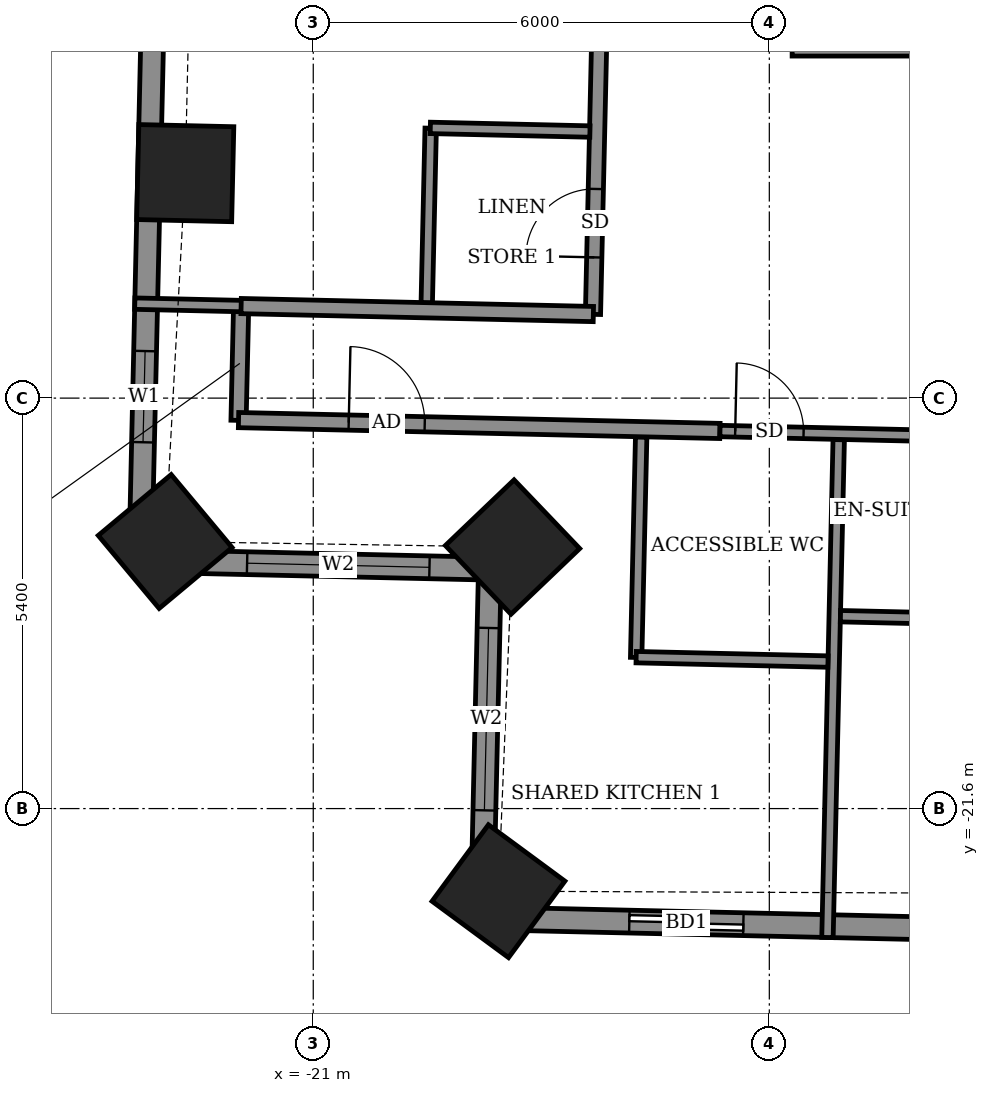
"""IFC4 building model, lengths in metres.
Left out: names, types, materials, properties, quantities, classifications, styles, units other than length and angle.
Written with IfcOpenShell. Run it as: python <this file> out.ifc"""

import sys

from ifc_helpers import new_model, si_unit, direction, frame, frame_2d, origin, origin_2d, place, context, subcontext, project, spatial, rectangle, extrude, element, fill, save


model = new_model("IFC4")
c1 = context("Model", 3, precision=1e-05, world=origin(), true_north=direction((0.0, 1.0)))
c2 = subcontext(c1, "Body", "Model", "MODEL_VIEW")
j1 = project(units=[si_unit("LENGTHUNIT", "METRE"), si_unit("PLANEANGLEUNIT", "RADIAN")], contexts=[c1])
p1 = place(None, origin())
s1 = spatial("IfcSite", under=j1, at=p1, CompositionType="ELEMENT")
p2 = place(p1, origin())
s2 = spatial("IfcBuilding", under=s1, at=p2, CompositionType="ELEMENT")
p3 = place(p2, frame((0.0, 0.0, 152.7)))
s3 = spatial("IfcBuildingStorey", under=s2, at=p3, CompositionType="ELEMENT", Elevation=152.7)
for number, where, z_axis, x_axis in (
    (1, (-22.684, -13.24, -0.55), (0.0, 0.0, 1.0), (-0.023, -1.0, 0.0)),
    (2, (-22.948, -18.086, -0.55), (0.0, 0.0, 1.0), (0.641, -0.768, 0.0)),
    (3, (-18.378, -18.159, -0.55), (0.0, 0.0, 1.0), (0.691, -0.723, 0.0)),
    (4, (-18.563, -22.687, -0.55), (0.0, 0.0, 1.0), (0.805, -0.593, 0.0)),
):
    element("IfcColumn", number, at=place(p3, frame(where, z_axis=z_axis, x_axis=x_axis)), inside=s3, PredefinedType="COLUMN", context=c2, shape_type="SweptSolid", body=[
        extrude(rectangle(XDim=1.25, YDim=1.25, at=origin_2d()), origin(), (0.0, 0.0, 1.0), 3.6),
    ])
p4 = place(p3, frame((-23.038, -7.913, 0.0), z_axis=(0.0, 0.0, 1.0), x_axis=(-0.022705985163, -0.999742185885, 0.0)))
e5 = element("IfcWall", 5, at=p4, inside=s3, PredefinedType="SOLIDWALL", context=c2, shape_type="SweptSolid", body=[
    extrude(rectangle(XDim=10.43, YDim=0.3, at=frame_2d((5.215, 0.0))), origin(), (0.0, 0.0, 1.0), 3.05),
])
p5 = place(p4, frame((1.936, 0.0, 0.0)))
e6 = element("IfcOpeningElement", 6, at=p5, cuts=e5, PredefinedType="OPENING", context=c2, shape_type="SweptSolid", body=[
    extrude(rectangle(XDim=1.5, YDim=2.4, at=frame_2d((0.75, 1.2))), frame((0.0, 0.16, 0.0), z_axis=(0.0, -1.0, 0.0), x_axis=(1.0, 0.0, 0.0)), (0.0, 0.0, 1.0), 0.32),
])
p6 = place(p4, frame((7.67, 0.0, 0.9)))
e7 = element("IfcOpeningElement", 7, at=p6, cuts=e5, PredefinedType="OPENING", context=c2, shape_type="SweptSolid", body=[
    extrude(rectangle(XDim=1.2, YDim=1.5, at=frame_2d((0.6, 0.75))), frame((0.0, 0.16, 0.0), z_axis=(0.0, -1.0, 0.0), x_axis=(1.0, 0.0, 0.0)), (0.0, 0.0, 1.0), 0.32),
])
p7 = place(p3, frame((-23.275, -18.34, 0.0), z_axis=(0.0, 0.0, 1.0), x_axis=(0.999744377441, -0.022609285172, 0.0)))
e8 = element("IfcWall", 8, at=p7, inside=s3, PredefinedType="SOLIDWALL", context=c2, shape_type="SweptSolid", body=[
    extrude(rectangle(XDim=4.6, YDim=0.3, at=frame_2d((2.3, 0.0))), origin(), (0.0, 0.0, 1.0), 2.55),
])
p8 = place(p7, frame((1.405, 0.0, 0.9)))
e9 = element("IfcOpeningElement", 9, at=p8, cuts=e8, PredefinedType="OPENING", context=c2, shape_type="SweptSolid", body=[
    extrude(rectangle(XDim=2.4, YDim=1.5, at=frame_2d((1.2, 0.75))), frame((0.0, 0.16, 0.0), z_axis=(0.0, -1.0, 0.0), x_axis=(1.0, 0.0, 0.0)), (0.0, 0.0, 1.0), 0.32),
])
p9 = place(p3, frame((-18.676, -18.444, 0.0), z_axis=(0.0, 0.0, 1.0), x_axis=(-0.022821468877, -0.999739556364, 0.0)))
e10 = element("IfcWall", 10, at=p9, inside=s3, PredefinedType="SOLIDWALL", context=c2, shape_type="SweptSolid", body=[
    extrude(rectangle(XDim=4.6, YDim=0.3, at=frame_2d((2.3, 0.0))), origin(), (0.0, 0.0, 1.0), 2.55),
])
p10 = place(p9, frame((0.78, 0.0, 0.9)))
e11 = element("IfcOpeningElement", 11, at=p10, cuts=e10, PredefinedType="OPENING", context=c2, shape_type="SweptSolid", body=[
    extrude(rectangle(XDim=2.4, YDim=1.5, at=frame_2d((1.2, 0.75))), frame((0.0, 0.16, 0.0), z_axis=(0.0, -1.0, 0.0), x_axis=(1.0, 0.0, 0.0)), (0.0, 0.0, 1.0), 0.32),
])
p11 = place(p3, frame((-18.781, -23.043, 0.0), z_axis=(0.0, 0.0, 1.0), x_axis=(0.999742794992, -0.022679150367, 0.0)))
e12 = element("IfcWall", 12, at=p11, inside=s3, PredefinedType="SOLIDWALL", context=c2, shape_type="SweptSolid", body=[
    extrude(rectangle(XDim=38.98, YDim=0.3, at=frame_2d((19.49, 0.0))), origin(), (0.0, 0.0, 1.0), 3.05),
])
p12 = place(p11, frame((1.94, 0.0, 0.0)))
e13 = element("IfcOpeningElement", 13, at=p12, cuts=e12, PredefinedType="OPENING", context=c2, shape_type="SweptSolid", body=[
    extrude(rectangle(XDim=1.5, YDim=2.4, at=frame_2d((0.75, 1.2))), frame((0.0, 0.16, 0.0), z_axis=(0.0, -1.0, 0.0), x_axis=(1.0, 0.0, 0.0)), (0.0, 0.0, 1.0), 0.32),
])
p13 = place(p11, frame((7.211, 0.0, 0.0)))
e14 = element("IfcOpeningElement", 14, at=p13, cuts=e12, PredefinedType="OPENING", context=c2, shape_type="SweptSolid", body=[
    extrude(rectangle(XDim=1.2, YDim=2.4, at=frame_2d((0.6, 1.2))), frame((0.0, 0.16, 0.0), z_axis=(0.0, -1.0, 0.0), x_axis=(1.0, 0.0, 0.0)), (0.0, 0.0, 1.0), 0.32),
])
p14 = place(p11, frame((9.959, 0.0, 0.0)))
e15 = element("IfcOpeningElement", 15, at=p14, cuts=e12, PredefinedType="OPENING", context=c2, shape_type="SweptSolid", body=[
    extrude(rectangle(XDim=1.5, YDim=2.4, at=frame_2d((0.75, 1.2))), frame((0.0, 0.16, 0.0), z_axis=(0.0, -1.0, 0.0), x_axis=(1.0, 0.0, 0.0)), (0.0, 0.0, 1.0), 0.32),
])
p15 = place(p11, frame((14.659, 0.0, 0.0)))
e16 = element("IfcOpeningElement", 16, at=p15, cuts=e12, PredefinedType="OPENING", context=c2, shape_type="SweptSolid", body=[
    extrude(rectangle(XDim=1.5, YDim=2.4, at=frame_2d((0.75, 1.2))), frame((0.0, 0.16, 0.0), z_axis=(0.0, -1.0, 0.0), x_axis=(1.0, 0.0, 0.0)), (0.0, 0.0, 1.0), 0.32),
])
p16 = place(p11, frame((20.232, 0.0, 0.0)))
e17 = element("IfcOpeningElement", 17, at=p16, cuts=e12, PredefinedType="OPENING", context=c2, shape_type="SweptSolid", body=[
    extrude(rectangle(XDim=1.2, YDim=2.4, at=frame_2d((0.6, 1.2))), frame((0.0, 0.16, 0.0), z_axis=(0.0, -1.0, 0.0), x_axis=(1.0, 0.0, 0.0)), (0.0, 0.0, 1.0), 0.32),
])
p17 = place(p11, frame((22.981, 0.0, 0.0)))
e18 = element("IfcOpeningElement", 18, at=p17, cuts=e12, PredefinedType="OPENING", context=c2, shape_type="SweptSolid", body=[
    extrude(rectangle(XDim=1.5, YDim=2.4, at=frame_2d((0.75, 1.2))), frame((0.0, 0.16, 0.0), z_axis=(0.0, -1.0, 0.0), x_axis=(1.0, 0.0, 0.0)), (0.0, 0.0, 1.0), 0.32),
])
p18 = place(p11, frame((27.681, 0.0, 0.0)))
e19 = element("IfcOpeningElement", 19, at=p18, cuts=e12, PredefinedType="OPENING", context=c2, shape_type="SweptSolid", body=[
    extrude(rectangle(XDim=1.5, YDim=2.4, at=frame_2d((0.75, 1.2))), frame((0.0, 0.16, 0.0), z_axis=(0.0, -1.0, 0.0), x_axis=(1.0, 0.0, 0.0)), (0.0, 0.0, 1.0), 0.32),
])
p19 = place(p11, frame((30.654, 0.0, 0.0)))
e20 = element("IfcOpeningElement", 20, at=p19, cuts=e12, PredefinedType="OPENING", context=c2, shape_type="SweptSolid", body=[
    extrude(rectangle(XDim=1.2, YDim=2.4, at=frame_2d((0.6, 1.2))), frame((0.0, 0.16, 0.0), z_axis=(0.0, -1.0, 0.0), x_axis=(1.0, 0.0, 0.0)), (0.0, 0.0, 1.0), 0.32),
])
p20 = place(p11, frame((35.176, 0.0, 0.9)))
e21 = element("IfcOpeningElement", 21, at=p20, cuts=e12, PredefinedType="OPENING", context=c2, shape_type="SweptSolid", body=[
    extrude(rectangle(XDim=2.4, YDim=1.5, at=frame_2d((1.2, 0.75))), frame((0.0, 0.16, 0.0), z_axis=(0.0, -1.0, 0.0), x_axis=(1.0, 0.0, 0.0)), (0.0, 0.0, 1.0), 0.32),
])
p21 = place(p3, frame((-14.235, -23.296, 0.0), z_axis=(0.0, 0.0, 1.0), x_axis=(0.022623197363, 0.999744062719, 0.0)))
e22 = element("IfcWall", 22, at=p21, inside=s3, PredefinedType="PARTITIONING", context=c2, shape_type="SweptSolid", body=[
    extrude(rectangle(XDim=6.551, YDim=0.15, at=frame_2d((3.275, 0.0))), origin(), (0.0, 0.0, 1.0), 2.55),
])
p22 = place(p3, frame((-16.752, -19.612, 0.0), z_axis=(0.0, 0.0, 1.0), x_axis=(0.022730967319, 0.999741618182, 0.0)))
e23 = element("IfcWall", 23, at=p22, inside=s3, PredefinedType="PARTITIONING", context=c2, shape_type="SweptSolid", body=[
    extrude(rectangle(XDim=2.9, YDim=0.15, at=frame_2d((1.45, 0.0))), origin(), (0.0, 0.0, 1.0), 3.05),
])
p23 = place(p3, frame((-16.752, -19.608, 0.0), z_axis=(0.0, 0.0, 1.0), x_axis=(0.999735102249, -0.023015762656, 0.0)))
e24 = element("IfcWall", 24, at=p23, inside=s3, PredefinedType="PARTITIONING", context=c2, shape_type="SweptSolid", body=[
    extrude(rectangle(XDim=2.525, YDim=0.15, at=frame_2d((1.262, 0.0))), origin(), (0.0, 0.0, 1.0), 3.05),
])
p24 = place(p3, frame((-14.064, -19.069, 0.0), z_axis=(0.0, 0.0, 1.0), x_axis=(0.999740260747, -0.02279059109, 0.0)))
e25 = element("IfcWall", 25, at=p24, inside=s3, PredefinedType="PARTITIONING", context=c2, shape_type="SweptSolid", body=[
    extrude(rectangle(XDim=2.324, YDim=0.15, at=frame_2d((1.162, 0.0))), origin(), (0.0, 0.0, 1.0), 3.05),
])
p25 = place(p3, frame((-21.983, -16.493, 0.0), z_axis=(0.0, 0.0, 1.0), x_axis=(0.022617910375, 0.999744182344, 0.0)))
e26 = element("IfcWall", 26, at=p25, inside=s3, PredefinedType="PARTITIONING", context=c2, shape_type="SweptSolid", body=[
    extrude(rectangle(XDim=1.5, YDim=0.2, at=frame_2d((0.75, 0.0))), origin(), (0.0, 0.0, 1.0), 3.05),
])
p26 = place(p3, frame((-21.983, -16.489, 0.0), z_axis=(0.0, 0.0, 1.0), x_axis=(0.999744930163, -0.022584831499, 0.0)))
e27 = element("IfcWall", 27, at=p26, inside=s3, PredefinedType="PARTITIONING", context=c2, shape_type="SweptSolid", body=[
    extrude(rectangle(XDim=6.335, YDim=0.2, at=frame_2d((3.167, 0.0))), origin(), (0.0, 0.0, 1.0), 3.05),
])
p27 = place(p26, frame((1.45, 0.0, 0.0)))
e28 = element("IfcOpeningElement", 28, at=p27, cuts=e27, PredefinedType="OPENING", context=c2, shape_type="SweptSolid", body=[
    extrude(rectangle(XDim=1.0, YDim=2.1, at=frame_2d((0.5, 1.05))), frame((0.0, 0.11, 0.0), z_axis=(0.0, -1.0, 0.0), x_axis=(1.0, 0.0, 0.0)), (0.0, 0.0, 1.0), 0.22),
])
p28 = place(p3, frame((-15.649, -16.633, 0.0), z_axis=(0.0, 0.0, 1.0), x_axis=(0.999743261737, -0.022658565952, 0.0)))
e29 = element("IfcWall", 29, at=p28, inside=s3, PredefinedType="PARTITIONING", context=c2, shape_type="SweptSolid", body=[
    extrude(rectangle(XDim=30.536, YDim=0.15, at=frame_2d((15.268, 0.0))), origin(), (0.0, 0.0, 1.0), 3.05),
])
p29 = place(p28, frame((0.2, 0.0, 0.0)))
e30 = element("IfcOpeningElement", 30, at=p29, cuts=e29, PredefinedType="OPENING", context=c2, shape_type="SweptSolid", body=[
    extrude(rectangle(XDim=0.9, YDim=2.1, at=frame_2d((0.45, 1.05))), frame((0.0, 0.085, 0.0), z_axis=(0.0, -1.0, 0.0), x_axis=(1.0, 0.0, 0.0)), (0.0, 0.0, 1.0), 0.17),
])
p30 = place(p28, frame((4.465, 0.0, 0.0)))
e31 = element("IfcOpeningElement", 31, at=p30, cuts=e29, PredefinedType="OPENING", context=c2, shape_type="SweptSolid", body=[
    extrude(rectangle(XDim=0.9, YDim=2.1, at=frame_2d((0.45, 1.05))), frame((0.0, 0.085, 0.0), z_axis=(0.0, -1.0, 0.0), x_axis=(1.0, 0.0, 0.0)), (0.0, 0.0, 1.0), 0.17),
])
p31 = place(p28, frame((6.315, 0.0, 0.0)))
e32 = element("IfcOpeningElement", 32, at=p31, cuts=e29, PredefinedType="OPENING", context=c2, shape_type="SweptSolid", body=[
    extrude(rectangle(XDim=0.9, YDim=2.1, at=frame_2d((0.45, 1.05))), frame((0.0, 0.085, 0.0), z_axis=(0.0, -1.0, 0.0), x_axis=(1.0, 0.0, 0.0)), (0.0, 0.0, 1.0), 0.17),
])
p32 = place(p28, frame((13.04, 0.0, 0.0)))
e33 = element("IfcOpeningElement", 33, at=p32, cuts=e29, PredefinedType="OPENING", context=c2, shape_type="SweptSolid", body=[
    extrude(rectangle(XDim=0.9, YDim=2.1, at=frame_2d((0.45, 1.05))), frame((0.0, 0.085, 0.0), z_axis=(0.0, -1.0, 0.0), x_axis=(1.0, 0.0, 0.0)), (0.0, 0.0, 1.0), 0.17),
])
p33 = place(p28, frame((15.015, 0.0, 0.0)))
e34 = element("IfcOpeningElement", 34, at=p33, cuts=e29, PredefinedType="OPENING", context=c2, shape_type="SweptSolid", body=[
    extrude(rectangle(XDim=0.9, YDim=2.1, at=frame_2d((0.45, 1.05))), frame((0.0, 0.085, 0.0), z_axis=(0.0, -1.0, 0.0), x_axis=(1.0, 0.0, 0.0)), (0.0, 0.0, 1.0), 0.17),
])
p34 = place(p28, frame((21.74, 0.0, 0.0)))
e35 = element("IfcOpeningElement", 35, at=p34, cuts=e29, PredefinedType="OPENING", context=c2, shape_type="SweptSolid", body=[
    extrude(rectangle(XDim=0.9, YDim=2.1, at=frame_2d((0.45, 1.05))), frame((0.0, 0.085, 0.0), z_axis=(0.0, -1.0, 0.0), x_axis=(1.0, 0.0, 0.0)), (0.0, 0.0, 1.0), 0.17),
])
p35 = place(p28, frame((23.665, 0.0, 0.0)))
e36 = element("IfcOpeningElement", 36, at=p35, cuts=e29, PredefinedType="OPENING", context=c2, shape_type="SweptSolid", body=[
    extrude(rectangle(XDim=0.9, YDim=2.1, at=frame_2d((0.45, 1.05))), frame((0.0, 0.085, 0.0), z_axis=(0.0, -1.0, 0.0), x_axis=(1.0, 0.0, 0.0)), (0.0, 0.0, 1.0), 0.17),
])
p36 = place(p3, frame((-19.507, -14.949, 0.0), z_axis=(0.0, 0.0, 1.0), x_axis=(0.022603288534, 0.999744513037, 0.0)))
e37 = element("IfcWall", 37, at=p36, inside=s3, PredefinedType="PARTITIONING", context=c2, shape_type="SweptSolid", body=[
    extrude(rectangle(XDim=2.301, YDim=0.15, at=frame_2d((1.15, 0.0))), origin(), (0.0, 0.0, 1.0), 3.05),
])
p37 = place(p3, frame((-17.32, -15.098, 0.0), z_axis=(0.0, 0.0, 1.0), x_axis=(0.022694293906, 0.999742451346, 0.0)))
e38 = element("IfcWall", 38, at=p37, inside=s3, PredefinedType="PARTITIONING", context=c2, shape_type="SweptSolid", body=[
    extrude(rectangle(XDim=28.024, YDim=0.2, at=frame_2d((14.012, 0.0))), origin(), (0.0, 0.0, 1.0), 3.05),
])
p38 = place(p37, frame((24.212, 0.0, 0.0)))
e39 = element("IfcOpeningElement", 39, at=p38, cuts=e38, PredefinedType="OPENING", context=c2, shape_type="SweptSolid", body=[
    extrude(rectangle(XDim=1.0, YDim=2.1, at=frame_2d((0.5, 1.05))), frame((0.0, 0.11, 0.0), z_axis=(0.0, -1.0, 0.0), x_axis=(1.0, 0.0, 0.0)), (0.0, 0.0, 1.0), 0.22),
])
p39 = place(p37, frame((26.374, 0.0, 0.0)))
e40 = element("IfcOpeningElement", 40, at=p39, cuts=e38, PredefinedType="OPENING", context=c2, shape_type="SweptSolid", body=[
    extrude(rectangle(XDim=0.9, YDim=2.1, at=frame_2d((0.45, 1.05))), frame((0.0, 0.11, 0.0), z_axis=(0.0, -1.0, 0.0), x_axis=(1.0, 0.0, 0.0)), (0.0, 0.0, 1.0), 0.22),
])
p40 = place(p37, frame((21.774, 0.0, 0.0)))
e41 = element("IfcOpeningElement", 41, at=p40, cuts=e38, PredefinedType="OPENING", context=c2, shape_type="SweptSolid", body=[
    extrude(rectangle(XDim=1.0, YDim=2.1, at=frame_2d((0.5, 1.05))), frame((0.0, 0.11, 0.0), z_axis=(0.0, -1.0, 0.0), x_axis=(1.0, 0.0, 0.0)), (0.0, 0.0, 1.0), 0.22),
])
p41 = place(p37, frame((18.65, 0.0, 0.0)))
e42 = element("IfcOpeningElement", 42, at=p41, cuts=e38, PredefinedType="OPENING", context=c2, shape_type="SweptSolid", body=[
    extrude(rectangle(XDim=1.0, YDim=2.1, at=frame_2d((0.5, 1.05))), frame((0.0, 0.11, 0.0), z_axis=(0.0, -1.0, 0.0), x_axis=(1.0, 0.0, 0.0)), (0.0, 0.0, 1.0), 0.22),
])
p42 = place(p37, frame((15.626, 0.0, 0.0)))
e43 = element("IfcOpeningElement", 43, at=p42, cuts=e38, PredefinedType="OPENING", context=c2, shape_type="SweptSolid", body=[
    extrude(rectangle(XDim=1.0, YDim=2.1, at=frame_2d((0.5, 1.05))), frame((0.0, 0.11, 0.0), z_axis=(0.0, -1.0, 0.0), x_axis=(1.0, 0.0, 0.0)), (0.0, 0.0, 1.0), 0.22),
])
p43 = place(p37, frame((12.557, 0.0, 0.0)))
e44 = element("IfcOpeningElement", 44, at=p43, cuts=e38, PredefinedType="OPENING", context=c2, shape_type="SweptSolid", body=[
    extrude(rectangle(XDim=1.0, YDim=2.1, at=frame_2d((0.5, 1.05))), frame((0.0, 0.11, 0.0), z_axis=(0.0, -1.0, 0.0), x_axis=(1.0, 0.0, 0.0)), (0.0, 0.0, 1.0), 0.22),
])
p44 = place(p37, frame((10.049, 0.0, 0.0)))
e45 = element("IfcOpeningElement", 45, at=p44, cuts=e38, PredefinedType="OPENING", context=c2, shape_type="SweptSolid", body=[
    extrude(rectangle(XDim=1.0, YDim=2.1, at=frame_2d((0.5, 1.05))), frame((0.0, 0.11, 0.0), z_axis=(0.0, -1.0, 0.0), x_axis=(1.0, 0.0, 0.0)), (0.0, 0.0, 1.0), 0.22),
])
p45 = place(p37, frame((7.849, 0.0, 0.0)))
e46 = element("IfcOpeningElement", 46, at=p45, cuts=e38, PredefinedType="OPENING", context=c2, shape_type="SweptSolid", body=[
    extrude(rectangle(XDim=0.9, YDim=2.1, at=frame_2d((0.45, 1.05))), frame((0.0, 0.11, 0.0), z_axis=(0.0, -1.0, 0.0), x_axis=(1.0, 0.0, 0.0)), (0.0, 0.0, 1.0), 0.22),
])
p46 = place(p37, frame((4.199, 0.0, 0.0)))
e47 = element("IfcOpeningElement", 47, at=p46, cuts=e38, PredefinedType="OPENING", context=c2, shape_type="SweptSolid", body=[
    extrude(rectangle(XDim=1.0, YDim=2.1, at=frame_2d((0.5, 1.05))), frame((0.0, 0.11, 0.0), z_axis=(0.0, -1.0, 0.0), x_axis=(1.0, 0.0, 0.0)), (0.0, 0.0, 1.0), 0.22),
])
p47 = place(p37, frame((0.75, 0.0, 0.0)))
e48 = element("IfcOpeningElement", 48, at=p47, cuts=e38, PredefinedType="OPENING", context=c2, shape_type="SweptSolid", body=[
    extrude(rectangle(XDim=0.9, YDim=2.1, at=frame_2d((0.45, 1.05))), frame((0.0, 0.11, 0.0), z_axis=(0.0, -1.0, 0.0), x_axis=(1.0, 0.0, 0.0)), (0.0, 0.0, 1.0), 0.22),
])
p48 = place(p3, frame((-23.348, -14.957, 0.0), z_axis=(0.0, 0.0, 1.0), x_axis=(0.999740216184, -0.022792545827, 0.0)))
e49 = element("IfcWall", 49, at=p48, inside=s3, PredefinedType="PARTITIONING", context=c2, shape_type="SweptSolid", body=[
    extrude(rectangle(XDim=1.403, YDim=0.15, at=frame_2d((0.702, 0.0))), origin(), (0.0, 0.0, 1.0), 2.55),
])
p49 = place(p3, frame((-21.949, -14.989, 0.0), z_axis=(0.0, 0.0, 1.0), x_axis=(0.999743491588, -0.022648422179, 0.0)))
e50 = element("IfcWall", 50, at=p49, inside=s3, PredefinedType="PARTITIONING", context=c2, shape_type="SweptSolid", body=[
    extrude(rectangle(XDim=4.635, YDim=0.2, at=frame_2d((2.318, 0.0))), origin(), (0.0, 0.0, 1.0), 3.05),
])
p50 = place(p3, frame((-19.46, -12.645, 0.0), z_axis=(0.0, 0.0, 1.0), x_axis=(0.999737799372, -0.022898307927, 0.0)))
e51 = element("IfcWall", 51, at=p50, inside=s3, PredefinedType="PARTITIONING", context=c2, shape_type="SweptSolid", body=[
    extrude(rectangle(XDim=2.1, YDim=0.15, at=frame_2d((1.05, 0.0))), origin(), (0.0, 0.0, 1.0), 3.05),
])
p51 = place(p3, frame((-14.7, -11.25, 0.0), z_axis=(0.0, 0.0, 1.0), x_axis=(1.0, 0.0, 0.0)))
e52 = element("IfcWall", 52, at=p51, inside=s3, PredefinedType="SHEAR", context=c2, shape_type="SweptSolid", body=[
    extrude(rectangle(XDim=29.4, YDim=0.9, at=frame_2d((14.7, 0.0))), origin(), (0.0, 0.0, 1.0), 3.6),
])
p52 = place(p6, origin())
e53 = element("IfcWindow", 53, at=p52, inside=s3, PartitioningType="SINGLE_PANEL", PredefinedType="WINDOW", context=c2, shape_type="SweptSolid", body=[
    extrude(rectangle(XDim=1.2, YDim=1.5, at=frame_2d((0.6, 0.75))), frame((0.0, 0.03, 0.0), z_axis=(0.0, -1.0, 0.0), x_axis=(1.0, 0.0, 0.0)), (0.0, 0.0, 1.0), 0.06),
])
fill(e7, e53)
p53 = place(p8, origin())
e54 = element("IfcWindow", 54, at=p53, inside=s3, PartitioningType="DOUBLE_PANEL_VERTICAL", PredefinedType="WINDOW", context=c2, shape_type="SweptSolid", body=[
    extrude(rectangle(XDim=2.4, YDim=1.5, at=frame_2d((1.2, 0.75))), frame((0.0, 0.03, 0.0), z_axis=(0.0, -1.0, 0.0), x_axis=(1.0, 0.0, 0.0)), (0.0, 0.0, 1.0), 0.06),
])
fill(e9, e54)
p54 = place(p10, origin())
e55 = element("IfcWindow", 55, at=p54, inside=s3, PartitioningType="DOUBLE_PANEL_VERTICAL", PredefinedType="WINDOW", context=c2, shape_type="SweptSolid", body=[
    extrude(rectangle(XDim=2.4, YDim=1.5, at=frame_2d((1.2, 0.75))), frame((0.0, 0.03, 0.0), z_axis=(0.0, -1.0, 0.0), x_axis=(1.0, 0.0, 0.0)), (0.0, 0.0, 1.0), 0.06),
])
fill(e11, e55)
p55 = place(p12, origin())
e56 = element("IfcDoor", 56, at=p55, inside=s3, OperationType="SLIDING_TO_LEFT", PredefinedType="DOOR", context=c2, shape_type="SweptSolid", body=[
    extrude(rectangle(XDim=1.5, YDim=2.4, at=frame_2d((0.75, 1.2))), frame((0.0, 0.025, 0.0), z_axis=(0.0, -1.0, 0.0), x_axis=(1.0, 0.0, 0.0)), (0.0, 0.0, 1.0), 0.05),
])
fill(e13, e56)
p56 = place(p27, origin())
e57 = element("IfcDoor", 57, at=p56, inside=s3, OperationType="SINGLE_SWING_LEFT", PredefinedType="DOOR", context=c2, shape_type="SweptSolid", body=[
    extrude(rectangle(XDim=1.0, YDim=2.1, at=frame_2d((0.5, 1.05))), frame((0.0, 0.025, 0.0), z_axis=(0.0, -1.0, 0.0), x_axis=(1.0, 0.0, 0.0)), (0.0, 0.0, 1.0), 0.05),
])
fill(e28, e57)
p57 = place(p29, origin())
e58 = element("IfcDoor", 58, at=p57, inside=s3, OperationType="SINGLE_SWING_LEFT", PredefinedType="DOOR", context=c2, shape_type="SweptSolid", body=[
    extrude(rectangle(XDim=0.9, YDim=2.1, at=frame_2d((0.45, 1.05))), frame((0.0, 0.025, 0.0), z_axis=(0.0, -1.0, 0.0), x_axis=(1.0, 0.0, 0.0)), (0.0, 0.0, 1.0), 0.05),
])
fill(e30, e58)
p58 = place(p47, origin())
e59 = element("IfcDoor", 59, at=p58, inside=s3, OperationType="SINGLE_SWING_LEFT", PredefinedType="DOOR", context=c2, shape_type="SweptSolid", body=[
    extrude(rectangle(XDim=0.9, YDim=2.1, at=frame_2d((0.45, 1.05))), frame((0.0, 0.025, 0.0), z_axis=(0.0, -1.0, 0.0), x_axis=(1.0, 0.0, 0.0)), (0.0, 0.0, 1.0), 0.05),
])
fill(e48, e59)
save(model, sys.argv[1])
